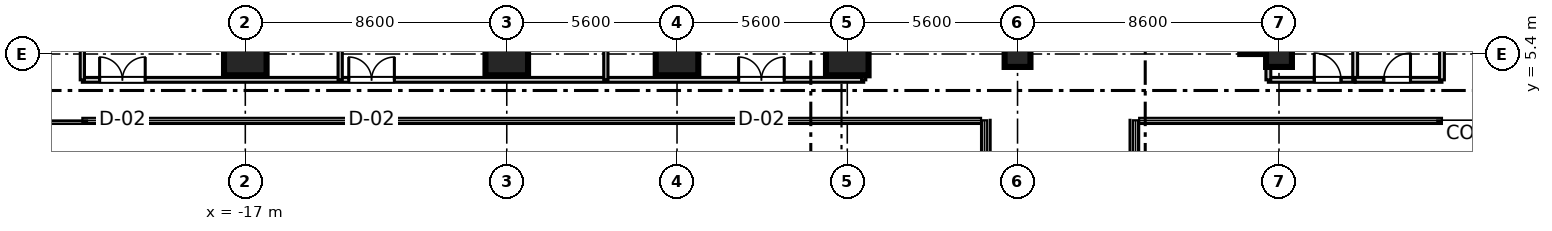
"""IFC4 building model, lengths in metres.
Left out: names, types, materials, properties, quantities, classifications, styles, units other than length and angle.
Written with IfcOpenShell. Run it as: python <this file> out.ifc"""

import sys

from ifc_helpers import new_model, si_unit, direction, frame, frame_2d, origin, origin_2d, place, context, subcontext, project, spatial, rectangle, extrude, source, transform, mapped, element, fill, save


model = new_model("IFC4")
c1 = context("Model", 3, precision=1e-05, world=origin(), true_north=direction((0.0, 1.0)))
c2 = subcontext(c1, "Body", "Model", "MODEL_VIEW")
j1 = project(units=[si_unit("LENGTHUNIT", "METRE"), si_unit("PLANEANGLEUNIT", "RADIAN")], contexts=[c1])
p1 = place(None, origin())
s1 = spatial("IfcSite", under=j1, at=p1, CompositionType="ELEMENT")
p2 = place(p1, origin())
s2 = spatial("IfcBuilding", under=s1, at=p2, CompositionType="ELEMENT")
p3 = place(p2, frame((0.0, 0.0, 47.0)))
s3 = spatial("IfcBuildingStorey", under=s2, at=p3, CompositionType="ELEMENT", Elevation=47.0)
m1 = source(origin(), c2, "Body", "SweptSolid", [
    extrude(rectangle(XDim=1.4, YDim=1.4, at=origin_2d()), origin(), (0.0, 0.0, 1.0), 3.605),
])
for number, where, z_axis, x_axis in (
    (1, (-17.0, 5.4, 0.0), (0.0, 0.0, 1.0), (1.0, 0.0, 0.0)),
    (2, (-8.4, 5.4, 0.0), (0.0, 0.0, 1.0), (1.0, 0.0, 0.0)),
    (3, (-2.8, 5.4, 0.0), (0.0, 0.0, 1.0), (1.0, 0.0, 0.0)),
    (4, (2.8, 5.4, 0.0), (0.0, 0.0, 1.0), (1.0, 0.0, 0.0)),
):
    element("IfcColumn", number, at=place(p3, frame(where, z_axis=z_axis, x_axis=x_axis)), inside=s3, PredefinedType="COLUMN", context=c2, shape_type="MappedRepresentation", body=[
        mapped(m1, transform((0.0, 0.0, 0.0), scale=1.0)),
    ])
m2 = source(origin(), c2, "Body", "SweptSolid", [
    extrude(rectangle(XDim=0.85, YDim=0.85, at=origin_2d()), origin(), (0.0, 0.0, 1.0), 3.605),
])
for number, where, z_axis, x_axis in (
    (5, (8.4, 5.4, 0.0), (0.0, 0.0, 1.0), (1.0, 0.0, 0.0)),
    (6, (17.0, 5.4, 0.0), (0.0, 0.0, 1.0), (1.0, 0.0, 0.0)),
):
    element("IfcColumn", number, at=place(p3, frame(where, z_axis=z_axis, x_axis=x_axis)), inside=s3, PredefinedType="PILASTER", context=c2, shape_type="MappedRepresentation", body=[
        mapped(m2, transform((0.0, 0.0, 0.0), scale=1.0)),
    ])
m3 = source(origin(), c2, "Body", "SweptSolid", [
    extrude(rectangle(XDim=11.6, YDim=0.65, at=frame_2d((5.8, 0.0))), origin(), (0.0, 0.0, 1.0), 3.37),
])
p4 = place(p3, frame((16.05, 5.4, 0.0), z_axis=(0.0, 0.0, 1.0), x_axis=(0.0, 1.0, 0.0)))
e7 = element("IfcWall", 7, at=p4, inside=s3, PredefinedType="SHEAR", context=c2, shape_type="MappedRepresentation", body=[
    mapped(m3, transform((0.0, 0.0, 0.0), scale=1.0)),
])
m4 = source(origin(), c2, "Body", "SweptSolid", [
    extrude(rectangle(XDim=2.855, YDim=0.16, at=frame_2d((1.427, 0.0))), origin(), (0.0, 0.0, 1.0), 2.71),
])
p5 = place(p3, frame((16.65, 4.55, 0.0), z_axis=(0.0, 0.0, 1.0), x_axis=(1.0, 0.0, 0.0)))
e8 = element("IfcWall", 8, at=p5, inside=s3, PredefinedType="PARTITIONING", context=c2, shape_type="MappedRepresentation", body=[
    mapped(m4, transform((0.0, 0.0, 0.0), scale=1.0)),
])
p6 = place(p5, frame((1.511, 0.0, 0.0)))
e9 = element("IfcOpeningElement", 9, at=p6, cuts=e8, PredefinedType="OPENING", context=c2, shape_type="SweptSolid", body=[
    extrude(rectangle(XDim=0.88, YDim=2.1, at=frame_2d((0.44, 1.05))), frame((0.0, 0.09, 0.0), z_axis=(0.0, -1.0, 0.0), x_axis=(1.0, 0.0, 0.0)), (0.0, 0.0, 1.0), 0.18),
])
m5 = source(origin(), c2, "Body", "SweptSolid", [
    extrude(rectangle(XDim=20.55, YDim=0.16, at=frame_2d((10.275, 0.0))), origin(), (0.0, 0.0, 1.0), 2.71),
])
for number, where, z_axis, x_axis in (
    (10, (16.65, 4.55, 0.0), (0.0, 0.0, 1.0), (0.0, 1.0, 0.0)),
    (11, (19.505, 4.55, 0.0), (0.0, 0.0, 1.0), (0.0, 1.0, 0.0)),
):
    element("IfcWall", number, at=place(p3, frame(where, z_axis=z_axis, x_axis=x_axis)), inside=s3, PredefinedType="PARTITIONING", context=c2, shape_type="MappedRepresentation", body=[
        mapped(m5, transform((0.0, 0.0, 0.0), scale=1.0)),
    ])
m6 = source(origin(), c2, "Body", "SweptSolid", [
    extrude(rectangle(XDim=2.855, YDim=0.16, at=frame_2d((1.428, 0.0))), origin(), (0.0, 0.0, 1.0), 2.71),
])
p7 = place(p3, frame((19.505, 4.55, 0.0), z_axis=(0.0, 0.0, 1.0), x_axis=(1.0, 0.0, 0.0)))
e12 = element("IfcWall", 12, at=p7, inside=s3, PredefinedType="PARTITIONING", context=c2, shape_type="MappedRepresentation", body=[
    mapped(m6, transform((0.0, 0.0, 0.0), scale=1.0)),
])
p8 = place(p7, frame((0.94, 0.0, 0.0)))
e13 = element("IfcOpeningElement", 13, at=p8, cuts=e12, PredefinedType="OPENING", context=c2, shape_type="SweptSolid", body=[
    extrude(rectangle(XDim=0.88, YDim=2.1, at=frame_2d((0.44, 1.05))), frame((0.0, 0.09, 0.0), z_axis=(0.0, -1.0, 0.0), x_axis=(1.0, 0.0, 0.0)), (0.0, 0.0, 1.0), 0.18),
])
m7 = source(origin(), c2, "Body", "SweptSolid", [
    extrude(rectangle(XDim=19.13, YDim=0.16, at=frame_2d((9.565, 0.0))), origin(), (0.0, 0.0, 1.0), 2.71),
])
p9 = place(p3, frame((22.36, 4.55, 0.0), z_axis=(0.0, 0.0, 1.0), x_axis=(0.0, 1.0, 0.0)))
e14 = element("IfcWall", 14, at=p9, inside=s3, PredefinedType="PARTITIONING", context=c2, shape_type="MappedRepresentation", body=[
    mapped(m7, transform((0.0, 0.0, 0.0), scale=1.0)),
])
m8 = source(origin(), c2, "Body", "SweptSolid", [
    extrude(rectangle(XDim=25.7, YDim=0.16, at=frame_2d((12.85, 0.0))), origin(), (0.0, 0.0, 1.0), 2.71),
])
p10 = place(p3, frame((-22.36, 4.55, 0.0), z_axis=(0.0, 0.0, 1.0), x_axis=(1.0, 0.0, 0.0)))
e15 = element("IfcWall", 15, at=p10, inside=s3, PredefinedType="PARTITIONING", context=c2, shape_type="MappedRepresentation", body=[
    mapped(m8, transform((0.0, 0.0, 0.0), scale=1.0)),
])
p11 = place(p10, frame((0.568, 0.0, 0.0)))
e16 = element("IfcOpeningElement", 16, at=p11, cuts=e15, PredefinedType="OPENING", context=c2, shape_type="SweptSolid", body=[
    extrude(rectangle(XDim=1.5, YDim=2.15, at=frame_2d((0.75, 1.075))), frame((0.0, 0.09, 0.0), z_axis=(0.0, -1.0, 0.0), x_axis=(1.0, 0.0, 0.0)), (0.0, 0.0, 1.0), 0.18),
])
p12 = place(p10, frame((8.763, 0.0, 0.0)))
e17 = element("IfcOpeningElement", 17, at=p12, cuts=e15, PredefinedType="OPENING", context=c2, shape_type="SweptSolid", body=[
    extrude(rectangle(XDim=1.5, YDim=2.15, at=frame_2d((0.75, 1.075))), frame((0.0, 0.09, 0.0), z_axis=(0.0, -1.0, 0.0), x_axis=(1.0, 0.0, 0.0)), (0.0, 0.0, 1.0), 0.18),
])
p13 = place(p10, frame((21.586, 0.0, 0.0)))
e18 = element("IfcOpeningElement", 18, at=p13, cuts=e15, PredefinedType="OPENING", context=c2, shape_type="SweptSolid", body=[
    extrude(rectangle(XDim=1.5, YDim=2.15, at=frame_2d((0.75, 1.075))), frame((0.0, 0.09, 0.0), z_axis=(0.0, -1.0, 0.0), x_axis=(1.0, 0.0, 0.0)), (0.0, 0.0, 1.0), 0.18),
])
m9 = source(origin(), c2, "Body", "SweptSolid", [
    extrude(rectangle(XDim=19.13, YDim=0.14, at=frame_2d((9.565, 0.0))), origin(), (0.0, 0.0, 1.0), 2.71),
])
p14 = place(p3, frame((-22.36, 4.55, 0.0), z_axis=(0.0, 0.0, 1.0), x_axis=(0.0, 1.0, 0.0)))
e19 = element("IfcWall", 19, at=p14, inside=s3, PredefinedType="PARTITIONING", context=c2, shape_type="MappedRepresentation", body=[
    mapped(m9, transform((0.0, 0.0, 0.0), scale=1.0)),
])
m10 = source(origin(), c2, "Body", "SweptSolid", [
    extrude(rectangle(XDim=20.55, YDim=0.14, at=frame_2d((10.275, 0.0))), origin(), (0.0, 0.0, 1.0), 2.71),
])
for number, where, z_axis, x_axis in (
    (20, (3.34, 4.55, 0.0), (0.0, 0.0, 1.0), (0.0, 1.0, 0.0)),
    (21, (-13.879, 4.55, 0.0), (0.0, 0.0, 1.0), (0.0, 1.0, 0.0)),
    (22, (-5.141, 4.55, 0.0), (0.0, 0.0, 1.0), (0.0, 1.0, 0.0)),
):
    element("IfcWall", number, at=place(p3, frame(where, z_axis=z_axis, x_axis=x_axis)), inside=s3, PredefinedType="PARTITIONING", context=c2, shape_type="MappedRepresentation", body=[
        mapped(m10, transform((0.0, 0.0, 0.0), scale=1.0)),
    ])
m11 = source(origin(), c2, "Body", "SweptSolid", [
    extrude(rectangle(XDim=0.88, YDim=2.1, at=frame_2d((0.44, 1.05))), frame((0.0, 0.025, 0.0), z_axis=(0.0, -1.0, 0.0), x_axis=(1.0, 0.0, 0.0)), (0.0, 0.0, 1.0), 0.05),
])
p15 = place(p6, origin())
e23 = element("IfcDoor", 23, at=p15, inside=s3, OperationType="SINGLE_SWING_LEFT", PredefinedType="DOOR", context=c2, shape_type="MappedRepresentation", body=[
    mapped(m11, transform((0.0, 0.0, 0.0), scale=1.0)),
])
fill(e9, e23)
p16 = place(p8, origin())
e24 = element("IfcDoor", 24, at=p16, inside=s3, OperationType="SINGLE_SWING_RIGHT", PredefinedType="DOOR", context=c2, shape_type="MappedRepresentation", body=[
    mapped(m11, transform((0.0, 0.0, 0.0), scale=1.0)),
])
fill(e13, e24)
m12 = source(origin(), c2, "Body", "SweptSolid", [
    extrude(rectangle(XDim=1.5, YDim=2.15, at=frame_2d((0.75, 1.075))), frame((0.0, 0.025, 0.0), z_axis=(0.0, -1.0, 0.0), x_axis=(1.0, 0.0, 0.0)), (0.0, 0.0, 1.0), 0.05),
])
p17 = place(p11, origin())
e25 = element("IfcDoor", 25, at=p17, inside=s3, OperationType="DOUBLE_DOOR_SINGLE_SWING", PredefinedType="DOOR", context=c2, shape_type="MappedRepresentation", body=[
    mapped(m12, transform((0.0, 0.0, 0.0), scale=1.0)),
])
fill(e16, e25)
p18 = place(p12, origin())
e26 = element("IfcDoor", 26, at=p18, inside=s3, OperationType="DOUBLE_DOOR_SINGLE_SWING", PredefinedType="DOOR", context=c2, shape_type="MappedRepresentation", body=[
    mapped(m12, transform((0.0, 0.0, 0.0), scale=1.0)),
])
fill(e17, e26)
p19 = place(p13, origin())
e27 = element("IfcDoor", 27, at=p19, inside=s3, OperationType="DOUBLE_DOOR_SINGLE_SWING", PredefinedType="DOOR", context=c2, shape_type="MappedRepresentation", body=[
    mapped(m12, transform((0.0, 0.0, 0.0), scale=1.0)),
])
fill(e18, e27)
save(model, sys.argv[1])
